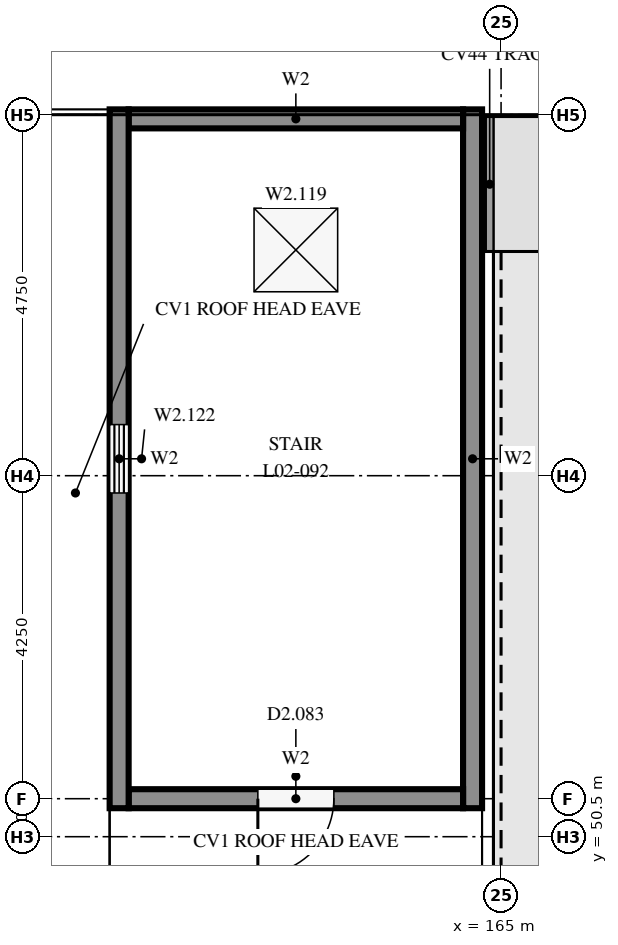
"""IFC4 building model, lengths in metres.
Left out: names, types, materials, properties, quantities, classifications, styles, units other than length and angle.
Written with IfcOpenShell. Run it as: python <this file> out.ifc"""

import sys

from ifc_helpers import new_model, si_unit, direction, frame, frame_2d, origin, origin_2d, place, context, subcontext, project, spatial, rectangle, extrude, element, fill, save


model = new_model("IFC4")
c1 = context("Model", 3, precision=1e-05, world=origin(), true_north=direction((0.0, 1.0)))
c2 = subcontext(c1, "Body", "Model", "MODEL_VIEW")
j1 = project(units=[si_unit("LENGTHUNIT", "METRE"), si_unit("PLANEANGLEUNIT", "RADIAN")], contexts=[c1])
p1 = place(None, origin())
s1 = spatial("IfcSite", under=j1, at=p1, CompositionType="ELEMENT")
p2 = place(p1, origin())
s2 = spatial("IfcBuilding", under=s1, at=p2, CompositionType="ELEMENT")
p3 = place(p2, frame((0.0, 0.0, 8.1)))
s3 = spatial("IfcBuildingStorey", under=s2, at=p3, CompositionType="ELEMENT", Elevation=8.1)
p4 = place(p3, frame((159.975, 50.875, 0.0), z_axis=(0.0, 0.0, 1.0), x_axis=(0.0, 1.0, 0.0)))
e1 = element("IfcWall", 1, at=p4, inside=s3, PredefinedType="SOLIDWALL", context=c2, shape_type="SweptSolid", body=[
    extrude(rectangle(XDim=9.195, YDim=0.25, at=frame_2d((4.598, 0.0))), origin(), (0.0, 0.0, 1.0), 2.45),
])
p5 = place(p4, frame((4.147, 0.0, 0.9)))
e2 = element("IfcOpeningElement", 2, at=p5, cuts=e1, PredefinedType="OPENING", context=c2, shape_type="SweptSolid", body=[
    extrude(rectangle(XDim=0.9, YDim=1.2, at=frame_2d((0.45, 0.6))), frame((0.0, 0.135, 0.0), z_axis=(0.0, -1.0, 0.0), x_axis=(1.0, 0.0, 0.0)), (0.0, 0.0, 1.0), 0.27),
])
p6 = place(p3, frame((164.625, 50.875, 0.0), z_axis=(0.0, 0.0, 1.0), x_axis=(0.0, 1.0, 0.0)))
e3 = element("IfcWall", 3, at=p6, inside=s3, PredefinedType="SOLIDWALL", context=c2, shape_type="SweptSolid", body=[
    extrude(rectangle(XDim=9.195, YDim=0.25, at=frame_2d((4.598, 0.0))), origin(), (0.0, 0.0, 1.0), 2.45),
])
p7 = place(p3, frame((164.5, 51.0, 0.0), z_axis=(0.0, 0.0, 1.0), x_axis=(-1.0, 0.0, 0.0)))
e4 = element("IfcWall", 4, at=p7, inside=s3, PredefinedType="SOLIDWALL", context=c2, shape_type="SweptSolid", body=[
    extrude(rectangle(XDim=4.4, YDim=0.25, at=frame_2d((2.2, 0.0))), origin(), (0.0, 0.0, 1.0), 2.45),
])
p8 = place(p7, frame((1.7, 0.0, 0.0)))
e5 = element("IfcOpeningElement", 5, at=p8, cuts=e4, PredefinedType="OPENING", context=c2, shape_type="SweptSolid", body=[
    extrude(rectangle(XDim=1.0, YDim=2.1, at=frame_2d((0.5, 1.05))), frame((0.0, 0.135, 0.0), z_axis=(0.0, -1.0, 0.0), x_axis=(1.0, 0.0, 0.0)), (0.0, 0.0, 1.0), 0.27),
])
p9 = place(p3, frame((160.1, 59.945, 0.0), z_axis=(0.0, 0.0, 1.0), x_axis=(1.0, 0.0, 0.0)))
e6 = element("IfcWall", 6, at=p9, inside=s3, PredefinedType="SOLIDWALL", context=c2, shape_type="SweptSolid", body=[
    extrude(rectangle(XDim=4.4, YDim=0.25, at=frame_2d((2.2, 0.0))), origin(), (0.0, 0.0, 1.0), 2.45),
])
p10 = place(p3, frame((0.0, 0.0, 2.45)))
p11 = place(p10, frame((162.3, 58.22, 0.0)))
p12 = place(p11, frame((0.0, 0.0, 0.15)))
e7 = element("IfcWindow", 7, at=p12, inside=s3, PartitioningType="SINGLE_PANEL", PredefinedType="SKYLIGHT", context=c2, shape_type="SweptSolid", body=[
    extrude(rectangle(XDim=1.1, YDim=1.1, at=origin_2d()), origin(), (0.0, 0.0, 1.0), 0.05),
])
p13 = place(p8, origin())
e8 = element("IfcDoor", 8, at=p13, inside=s3, OperationType="SINGLE_SWING_RIGHT", PredefinedType="DOOR", context=c2, shape_type="SweptSolid", body=[
    extrude(rectangle(XDim=1.0, YDim=2.1, at=frame_2d((0.5, 1.05))), frame((0.0, 0.025, 0.0), z_axis=(0.0, -1.0, 0.0), x_axis=(1.0, 0.0, 0.0)), (0.0, 0.0, 1.0), 0.05),
])
fill(e5, e8)
p14 = place(p5, origin())
e9 = element("IfcWindow", 9, at=p14, inside=s3, PartitioningType="SINGLE_PANEL", PredefinedType="WINDOW", context=c2, shape_type="SweptSolid", body=[
    extrude(rectangle(XDim=0.9, YDim=1.2, at=frame_2d((0.45, 0.6))), frame((0.0, 0.03, 0.0), z_axis=(0.0, -1.0, 0.0), x_axis=(1.0, 0.0, 0.0)), (0.0, 0.0, 1.0), 0.06),
])
fill(e2, e9)
save(model, sys.argv[1])
